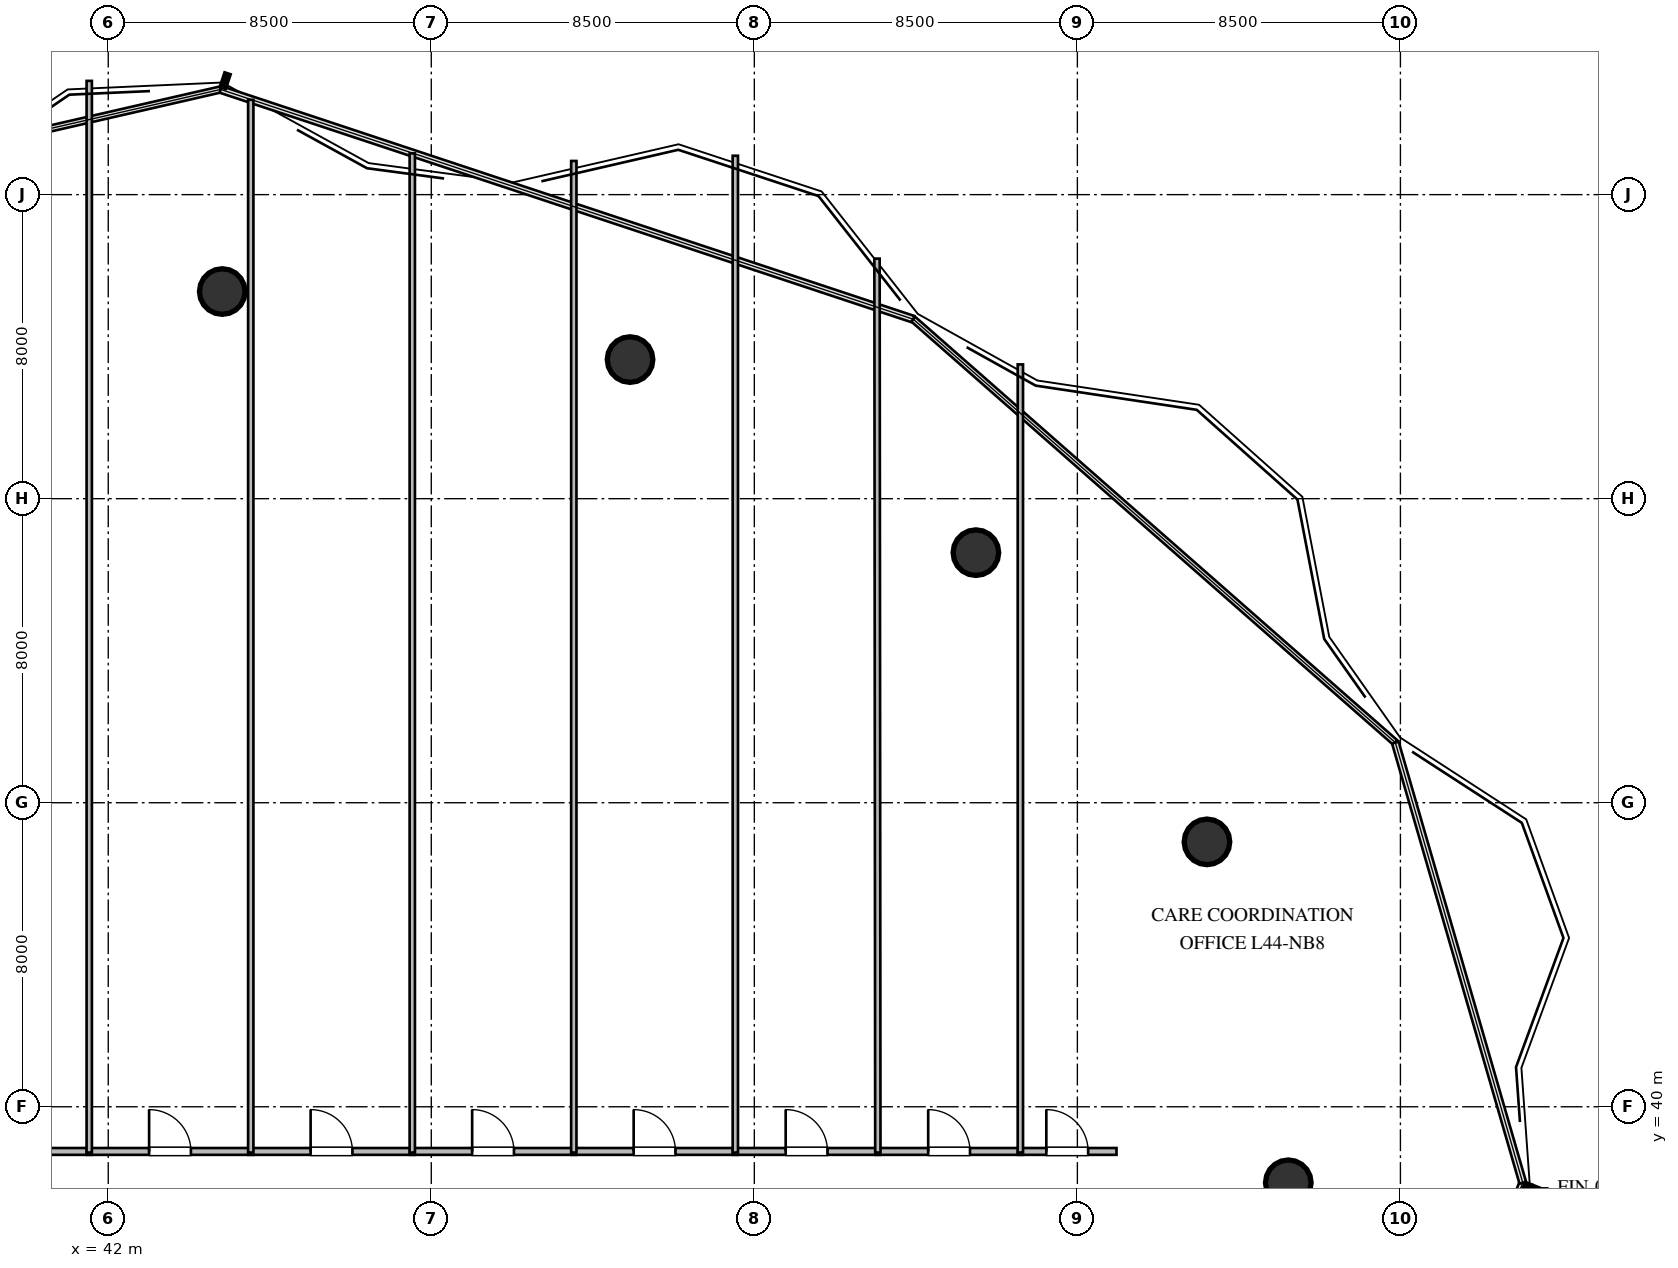
"""IFC4 building model, lengths in metres.
Left out: names, types, materials, properties, quantities, classifications, styles, units other than length and angle.
Written with IfcOpenShell. Run it as: python <this file> out.ifc"""

import sys

from ifc_helpers import new_model, si_unit, direction, frame, frame_2d, origin, origin_2d, place, context, subcontext, project, spatial, rectangle, circle, extrude, element, fill, save


model = new_model("IFC4")
c1 = context("Model", 3, precision=1e-05, world=origin(), true_north=direction((0.0, 1.0)))
c2 = subcontext(c1, "Body", "Model", "MODEL_VIEW")
j1 = project(units=[si_unit("LENGTHUNIT", "METRE"), si_unit("PLANEANGLEUNIT", "RADIAN")], contexts=[c1])
p1 = place(None, origin())
s1 = spatial("IfcSite", under=j1, at=p1, CompositionType="ELEMENT")
p2 = place(p1, origin())
s2 = spatial("IfcBuilding", under=s1, at=p2, CompositionType="ELEMENT")
p3 = place(p2, frame((0.0, 0.0, 167.4)))
s3 = spatial("IfcBuildingStorey", under=s2, at=p3, CompositionType="ELEMENT", Elevation=167.4)
for number, where, z_axis, x_axis in (
    (1, (73.05, 38.0, 0.0), (0.0, 0.0, 1.0), (1.0, 0.0, 0.0)),
    (2, (70.91, 46.97, 0.0), (0.0, 0.0, 1.0), (1.0, 0.0, 0.0)),
    (3, (64.83, 54.58, 0.0), (0.0, 0.0, 1.0), (1.0, 0.0, 0.0)),
    (4, (55.73, 59.66, 0.0), (0.0, 0.0, 1.0), (1.0, 0.0, 0.0)),
    (5, (45.0, 61.45, 0.0), (0.0, 0.0, 1.0), (1.0, 0.0, 0.0)),
):
    element("IfcColumn", number, at=place(p3, frame(where, z_axis=z_axis, x_axis=x_axis)), inside=s3, PredefinedType="COLUMN", context=c2, shape_type="SweptSolid", body=[
        extrude(circle(Radius=0.6, at=origin_2d()), origin(), (0.0, 0.0, 1.0), 3.6),
    ])
p4 = place(p3, frame((37.435, 38.825, 0.0), z_axis=(0.0, 0.0, 1.0), x_axis=(1.0, 0.0, 0.0)))
e6 = element("IfcWall", 6, at=p4, inside=s3, PredefinedType="PARTITIONING", context=c2, shape_type="SweptSolid", body=[
    extrude(rectangle(XDim=4.13, YDim=0.18, at=frame_2d((2.065, 0.0))), origin(), (0.0, 0.0, 1.0), 3.36),
])
p5 = place(p4, frame((1.515, 0.0, 0.0)))
e7 = element("IfcOpeningElement", 7, at=p5, cuts=e6, PredefinedType="OPENING", context=c2, shape_type="SweptSolid", body=[
    extrude(rectangle(XDim=1.1, YDim=2.1, at=frame_2d((0.55, 1.05))), frame((0.0, 0.1, 0.0), z_axis=(0.0, -1.0, 0.0), x_axis=(1.0, 0.0, 0.0)), (0.0, 0.0, 1.0), 0.2),
])
p6 = place(p3, frame((41.435, 38.825, 0.0), z_axis=(0.0, 0.0, 1.0), x_axis=(1.0, 0.0, 0.0)))
e8 = element("IfcWall", 8, at=p6, inside=s3, PredefinedType="PARTITIONING", context=c2, shape_type="SweptSolid", body=[
    extrude(rectangle(XDim=4.38, YDim=0.18, at=frame_2d((2.19, 0.0))), origin(), (0.0, 0.0, 1.0), 3.36),
])
p7 = place(p6, frame((1.64, 0.0, 0.0)))
e9 = element("IfcOpeningElement", 9, at=p7, cuts=e8, PredefinedType="OPENING", context=c2, shape_type="SweptSolid", body=[
    extrude(rectangle(XDim=1.1, YDim=2.1, at=frame_2d((0.55, 1.05))), frame((0.0, 0.1, 0.0), z_axis=(0.0, -1.0, 0.0), x_axis=(1.0, 0.0, 0.0)), (0.0, 0.0, 1.0), 0.2),
])
p8 = place(p3, frame((45.685, 38.825, 0.0), z_axis=(0.0, 0.0, 1.0), x_axis=(1.0, 0.0, 0.0)))
e10 = element("IfcWall", 10, at=p8, inside=s3, PredefinedType="PARTITIONING", context=c2, shape_type="SweptSolid", body=[
    extrude(rectangle(XDim=4.38, YDim=0.18, at=frame_2d((2.19, 0.0))), origin(), (0.0, 0.0, 1.0), 3.36),
])
p9 = place(p8, frame((1.64, 0.0, 0.0)))
e11 = element("IfcOpeningElement", 11, at=p9, cuts=e10, PredefinedType="OPENING", context=c2, shape_type="SweptSolid", body=[
    extrude(rectangle(XDim=1.1, YDim=2.1, at=frame_2d((0.55, 1.05))), frame((0.0, 0.1, 0.0), z_axis=(0.0, -1.0, 0.0), x_axis=(1.0, 0.0, 0.0)), (0.0, 0.0, 1.0), 0.2),
])
p10 = place(p3, frame((49.935, 38.825, 0.0), z_axis=(0.0, 0.0, 1.0), x_axis=(1.0, 0.0, 0.0)))
e12 = element("IfcWall", 12, at=p10, inside=s3, PredefinedType="PARTITIONING", context=c2, shape_type="SweptSolid", body=[
    extrude(rectangle(XDim=4.38, YDim=0.18, at=frame_2d((2.19, 0.0))), origin(), (0.0, 0.0, 1.0), 3.36),
])
p11 = place(p10, frame((1.64, 0.0, 0.0)))
e13 = element("IfcOpeningElement", 13, at=p11, cuts=e12, PredefinedType="OPENING", context=c2, shape_type="SweptSolid", body=[
    extrude(rectangle(XDim=1.1, YDim=2.1, at=frame_2d((0.55, 1.05))), frame((0.0, 0.1, 0.0), z_axis=(0.0, -1.0, 0.0), x_axis=(1.0, 0.0, 0.0)), (0.0, 0.0, 1.0), 0.2),
])
p12 = place(p3, frame((54.185, 38.825, 0.0), z_axis=(0.0, 0.0, 1.0), x_axis=(1.0, 0.0, 0.0)))
e14 = element("IfcWall", 14, at=p12, inside=s3, PredefinedType="PARTITIONING", context=c2, shape_type="SweptSolid", body=[
    extrude(rectangle(XDim=4.38, YDim=0.18, at=frame_2d((2.19, 0.0))), origin(), (0.0, 0.0, 1.0), 3.36),
])
p13 = place(p12, frame((1.64, 0.0, 0.0)))
e15 = element("IfcOpeningElement", 15, at=p13, cuts=e14, PredefinedType="OPENING", context=c2, shape_type="SweptSolid", body=[
    extrude(rectangle(XDim=1.1, YDim=2.1, at=frame_2d((0.55, 1.05))), frame((0.0, 0.1, 0.0), z_axis=(0.0, -1.0, 0.0), x_axis=(1.0, 0.0, 0.0)), (0.0, 0.0, 1.0), 0.2),
])
p14 = place(p3, frame((58.435, 38.825, 0.0), z_axis=(0.0, 0.0, 1.0), x_axis=(1.0, 0.0, 0.0)))
e16 = element("IfcWall", 16, at=p14, inside=s3, PredefinedType="PARTITIONING", context=c2, shape_type="SweptSolid", body=[
    extrude(rectangle(XDim=3.88, YDim=0.18, at=frame_2d((1.94, 0.0))), origin(), (0.0, 0.0, 1.0), 3.36),
])
p15 = place(p14, frame((1.39, 0.0, 0.0)))
e17 = element("IfcOpeningElement", 17, at=p15, cuts=e16, PredefinedType="OPENING", context=c2, shape_type="SweptSolid", body=[
    extrude(rectangle(XDim=1.1, YDim=2.1, at=frame_2d((0.55, 1.05))), frame((0.0, 0.1, 0.0), z_axis=(0.0, -1.0, 0.0), x_axis=(1.0, 0.0, 0.0)), (0.0, 0.0, 1.0), 0.2),
])
p16 = place(p3, frame((62.185, 38.825, 0.0), z_axis=(0.0, 0.0, 1.0), x_axis=(1.0, 0.0, 0.0)))
e18 = element("IfcWall", 18, at=p16, inside=s3, PredefinedType="PARTITIONING", context=c2, shape_type="SweptSolid", body=[
    extrude(rectangle(XDim=3.88, YDim=0.18, at=frame_2d((1.94, 0.0))), origin(), (0.0, 0.0, 1.0), 3.36),
])
p17 = place(p16, frame((1.39, 0.0, 0.0)))
e19 = element("IfcOpeningElement", 19, at=p17, cuts=e18, PredefinedType="OPENING", context=c2, shape_type="SweptSolid", body=[
    extrude(rectangle(XDim=1.1, YDim=2.1, at=frame_2d((0.55, 1.05))), frame((0.0, 0.1, 0.0), z_axis=(0.0, -1.0, 0.0), x_axis=(1.0, 0.0, 0.0)), (0.0, 0.0, 1.0), 0.2),
])
p18 = place(p3, frame((65.935, 38.825, 0.0), z_axis=(0.0, 0.0, 1.0), x_axis=(1.0, 0.0, 0.0)))
e20 = element("IfcWall", 20, at=p18, inside=s3, PredefinedType="PARTITIONING", context=c2, shape_type="SweptSolid", body=[
    extrude(rectangle(XDim=2.595, YDim=0.18, at=frame_2d((1.297, 0.0))), origin(), (0.0, 0.0, 1.0), 3.36),
])
p19 = place(p18, frame((0.748, 0.0, 0.0)))
e21 = element("IfcOpeningElement", 21, at=p19, cuts=e20, PredefinedType="OPENING", context=c2, shape_type="SweptSolid", body=[
    extrude(rectangle(XDim=1.1, YDim=2.1, at=frame_2d((0.55, 1.05))), frame((0.0, 0.1, 0.0), z_axis=(0.0, -1.0, 0.0), x_axis=(1.0, 0.0, 0.0)), (0.0, 0.0, 1.0), 0.2),
])
p20 = place(p3, frame((41.5, 66.993, 0.0), z_axis=(0.0, 0.0, 1.0), x_axis=(0.0, -1.0, 0.0)))
e22 = element("IfcWall", 22, at=p20, inside=s3, PredefinedType="PARTITIONING", context=c2, shape_type="SweptSolid", body=[
    extrude(rectangle(XDim=28.198, YDim=0.14, at=frame_2d((14.099, 0.0))), origin(), (0.0, 0.0, 1.0), 3.36),
])
p21 = place(p3, frame((45.75, 66.495, 0.0), z_axis=(0.0, 0.0, 1.0), x_axis=(0.0, -1.0, 0.0)))
e23 = element("IfcWall", 23, at=p21, inside=s3, PredefinedType="PARTITIONING", context=c2, shape_type="SweptSolid", body=[
    extrude(rectangle(XDim=27.7, YDim=0.14, at=frame_2d((13.85, 0.0))), origin(), (0.0, 0.0, 1.0), 3.36),
])
p22 = place(p3, frame((50.0, 65.085, 0.0), z_axis=(0.0, 0.0, 1.0), x_axis=(0.0, -1.0, 0.0)))
e24 = element("IfcWall", 24, at=p22, inside=s3, PredefinedType="PARTITIONING", context=c2, shape_type="SweptSolid", body=[
    extrude(rectangle(XDim=26.291, YDim=0.14, at=frame_2d((13.145, 0.0))), origin(), (0.0, 0.0, 1.0), 3.36),
])
p23 = place(p3, frame((54.25, 64.886, 0.0), z_axis=(0.0, 0.0, 1.0), x_axis=(0.0, -1.0, 0.0)))
e25 = element("IfcWall", 25, at=p23, inside=s3, PredefinedType="PARTITIONING", context=c2, shape_type="SweptSolid", body=[
    extrude(rectangle(XDim=26.091, YDim=0.14, at=frame_2d((13.045, 0.0))), origin(), (0.0, 0.0, 1.0), 3.36),
])
p24 = place(p3, frame((58.5, 65.023, 0.0), z_axis=(0.0, 0.0, 1.0), x_axis=(0.0, -1.0, 0.0)))
e26 = element("IfcWall", 26, at=p24, inside=s3, PredefinedType="PARTITIONING", context=c2, shape_type="SweptSolid", body=[
    extrude(rectangle(XDim=26.228, YDim=0.14, at=frame_2d((13.114, 0.0))), origin(), (0.0, 0.0, 1.0), 2.996),
])
p25 = place(p3, frame((62.228, 62.317, 0.0), z_axis=(0.0, 0.0, 1.0), x_axis=(0.000934132821, -0.999999563698, 0.0)))
e27 = element("IfcWall", 27, at=p25, inside=s3, PredefinedType="PARTITIONING", context=c2, shape_type="SweptSolid", body=[
    extrude(rectangle(XDim=23.522, YDim=0.14, at=frame_2d((11.761, 0.0))), origin(), (0.0, 0.0, 1.0), 3.36),
])
p26 = place(p3, frame((66.0, 59.533, 0.0), z_axis=(0.0, 0.0, 1.0), x_axis=(0.0, -1.0, 0.0)))
e28 = element("IfcWall", 28, at=p26, inside=s3, PredefinedType="PARTITIONING", context=c2, shape_type="SweptSolid", body=[
    extrude(rectangle(XDim=20.738, YDim=0.14, at=frame_2d((10.369, 0.0))), origin(), (0.0, 0.0, 1.0), 3.36),
])
p27 = place(p7, origin())
e29 = element("IfcDoor", 29, at=p27, inside=s3, OperationType="SINGLE_SWING_LEFT", PredefinedType="DOOR", context=c2, shape_type="SweptSolid", body=[
    extrude(rectangle(XDim=1.1, YDim=2.1, at=frame_2d((0.55, 1.05))), frame((0.0, 0.025, 0.0), z_axis=(0.0, -1.0, 0.0), x_axis=(1.0, 0.0, 0.0)), (0.0, 0.0, 1.0), 0.05),
])
fill(e9, e29)
p28 = place(p9, origin())
e30 = element("IfcDoor", 30, at=p28, inside=s3, OperationType="SINGLE_SWING_LEFT", PredefinedType="DOOR", context=c2, shape_type="SweptSolid", body=[
    extrude(rectangle(XDim=1.1, YDim=2.1, at=frame_2d((0.55, 1.05))), frame((0.0, 0.025, 0.0), z_axis=(0.0, -1.0, 0.0), x_axis=(1.0, 0.0, 0.0)), (0.0, 0.0, 1.0), 0.05),
])
fill(e11, e30)
p29 = place(p11, origin())
e31 = element("IfcDoor", 31, at=p29, inside=s3, OperationType="SINGLE_SWING_LEFT", PredefinedType="DOOR", context=c2, shape_type="SweptSolid", body=[
    extrude(rectangle(XDim=1.1, YDim=2.1, at=frame_2d((0.55, 1.05))), frame((0.0, 0.025, 0.0), z_axis=(0.0, -1.0, 0.0), x_axis=(1.0, 0.0, 0.0)), (0.0, 0.0, 1.0), 0.05),
])
fill(e13, e31)
p30 = place(p13, origin())
e32 = element("IfcDoor", 32, at=p30, inside=s3, OperationType="SINGLE_SWING_LEFT", PredefinedType="DOOR", context=c2, shape_type="SweptSolid", body=[
    extrude(rectangle(XDim=1.1, YDim=2.1, at=frame_2d((0.55, 1.05))), frame((0.0, 0.025, 0.0), z_axis=(0.0, -1.0, 0.0), x_axis=(1.0, 0.0, 0.0)), (0.0, 0.0, 1.0), 0.05),
])
fill(e15, e32)
p31 = place(p15, origin())
e33 = element("IfcDoor", 33, at=p31, inside=s3, OperationType="SINGLE_SWING_LEFT", PredefinedType="DOOR", context=c2, shape_type="SweptSolid", body=[
    extrude(rectangle(XDim=1.1, YDim=2.1, at=frame_2d((0.55, 1.05))), frame((0.0, 0.025, 0.0), z_axis=(0.0, -1.0, 0.0), x_axis=(1.0, 0.0, 0.0)), (0.0, 0.0, 1.0), 0.05),
])
fill(e17, e33)
p32 = place(p17, origin())
e34 = element("IfcDoor", 34, at=p32, inside=s3, OperationType="SINGLE_SWING_LEFT", PredefinedType="DOOR", context=c2, shape_type="SweptSolid", body=[
    extrude(rectangle(XDim=1.1, YDim=2.1, at=frame_2d((0.55, 1.05))), frame((0.0, 0.025, 0.0), z_axis=(0.0, -1.0, 0.0), x_axis=(1.0, 0.0, 0.0)), (0.0, 0.0, 1.0), 0.05),
])
fill(e19, e34)
p33 = place(p19, origin())
e35 = element("IfcDoor", 35, at=p33, inside=s3, OperationType="SINGLE_SWING_LEFT", PredefinedType="DOOR", context=c2, shape_type="SweptSolid", body=[
    extrude(rectangle(XDim=1.1, YDim=2.1, at=frame_2d((0.55, 1.05))), frame((0.0, 0.025, 0.0), z_axis=(0.0, -1.0, 0.0), x_axis=(1.0, 0.0, 0.0)), (0.0, 0.0, 1.0), 0.05),
])
fill(e21, e35)
save(model, sys.argv[1])
